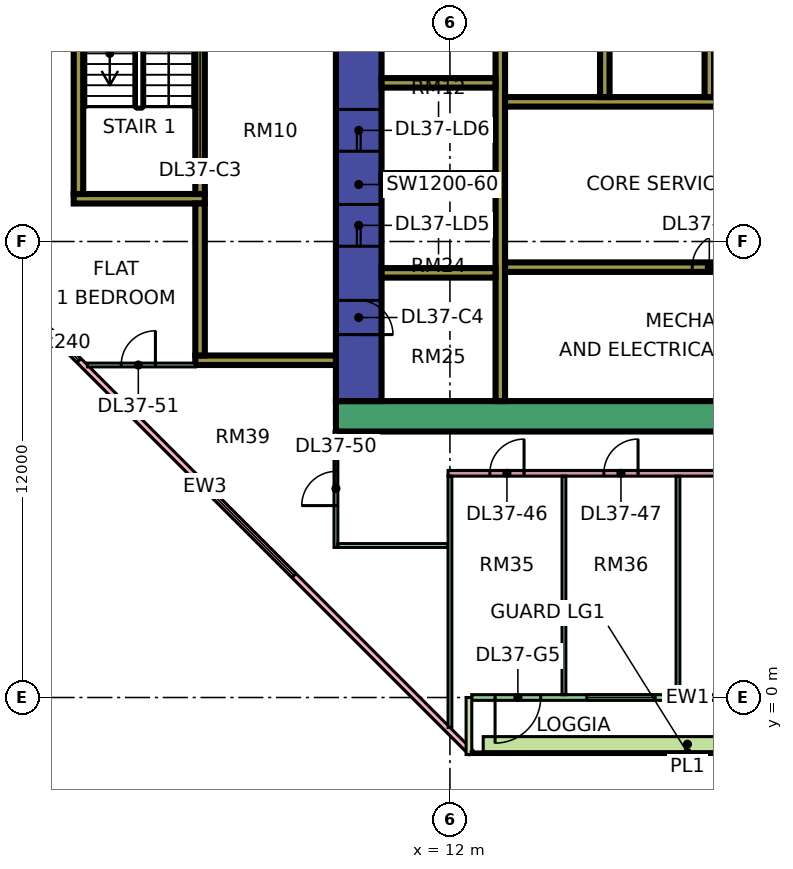
"""IFC4 building model, lengths in metres.
Left out: names, types, materials, properties, quantities, classifications, styles, units other than length and angle.
Written with IfcOpenShell. Run it as: python <this file> out.ifc"""

import sys

from ifc_helpers import new_model, si_unit, direction, frame, frame_2d, origin, place, context, subcontext, project, spatial, rectangle, extrude, element, fill, save


model = new_model("IFC4")
c1 = context("Model", 3, precision=1e-05, world=origin(), true_north=direction((0.0, 1.0)))
c2 = subcontext(c1, "Body", "Model", "MODEL_VIEW")
j1 = project(units=[si_unit("LENGTHUNIT", "METRE"), si_unit("PLANEANGLEUNIT", "RADIAN")], contexts=[c1])
p1 = place(None, origin())
s1 = spatial("IfcSite", under=j1, at=p1, CompositionType="ELEMENT")
p2 = place(p1, origin())
s2 = spatial("IfcBuilding", under=s1, at=p2, CompositionType="ELEMENT")
p3 = place(p2, frame((0.0, 0.0, 164.9)))
s3 = spatial("IfcBuildingStorey", under=s2, at=p3, CompositionType="ELEMENT", Elevation=164.9)
p4 = place(p3, frame((9.0, 7.4, 0.0), z_axis=(0.0, 0.0, 1.0), x_axis=(1.0, 0.0, 0.0)))
e1 = element("IfcWall", 1, at=p4, inside=s3, PredefinedType="SHEAR", context=c2, shape_type="SweptSolid", body=[
    extrude(rectangle(XDim=25.0, YDim=0.8, at=frame_2d((12.5, 0.0))), origin(), (0.0, 0.0, 1.0), 3.75),
])
p5 = place(p3, frame((9.6, 7.8, 0.0), z_axis=(0.0, 0.0, 1.0), x_axis=(0.0, 1.0, 0.0)))
e2 = element("IfcWall", 2, at=p5, inside=s3, PredefinedType="SHEAR", context=c2, shape_type="SweptSolid", body=[
    extrude(rectangle(XDim=11.4, YDim=1.2, at=frame_2d((5.7, 0.0))), origin(), (0.0, 0.0, 1.0), 3.75),
])
p6 = place(p5, frame((4.075, 0.0, 0.0)))
e3 = element("IfcOpeningElement", 3, at=p6, cuts=e2, PredefinedType="OPENING", context=c2, shape_type="SweptSolid", body=[
    extrude(rectangle(XDim=1.1, YDim=2.2, at=frame_2d((0.55, 1.1))), frame((0.0, 0.61, 0.0), z_axis=(0.0, -1.0, 0.0), x_axis=(1.0, 0.0, 0.0)), (0.0, 0.0, 1.0), 1.22),
])
p7 = place(p5, frame((6.575, 0.0, 0.0)))
e4 = element("IfcOpeningElement", 4, at=p7, cuts=e2, PredefinedType="OPENING", context=c2, shape_type="SweptSolid", body=[
    extrude(rectangle(XDim=1.1, YDim=2.2, at=frame_2d((0.55, 1.1))), frame((0.0, 0.61, 0.0), z_axis=(0.0, -1.0, 0.0), x_axis=(1.0, 0.0, 0.0)), (0.0, 0.0, 1.0), 1.22),
])
p8 = place(p5, frame((9.4, 0.0, 0.0)))
e5 = element("IfcOpeningElement", 5, at=p8, cuts=e2, PredefinedType="OPENING", context=c2, shape_type="SweptSolid", body=[
    extrude(rectangle(XDim=1.1, YDim=2.2, at=frame_2d((0.55, 1.1))), frame((0.0, 0.61, 0.0), z_axis=(0.0, -1.0, 0.0), x_axis=(1.0, 0.0, 0.0)), (0.0, 0.0, 1.0), 1.22),
])
p9 = place(p5, frame((1.75, 0.0, 0.0)))
e6 = element("IfcOpeningElement", 6, at=p9, cuts=e2, PredefinedType="OPENING", context=c2, shape_type="SweptSolid", body=[
    extrude(rectangle(XDim=0.9, YDim=2.1, at=frame_2d((0.45, 1.05))), frame((0.0, 0.61, 0.0), z_axis=(0.0, -1.0, 0.0), x_axis=(1.0, 0.0, 0.0)), (0.0, 0.0, 1.0), 1.22),
])
p10 = place(p3, frame((13.325, 7.8, 0.0), z_axis=(0.0, 0.0, 1.0), x_axis=(0.0, 1.0, 0.0)))
e7 = element("IfcWall", 7, at=p10, inside=s3, PredefinedType="SHEAR", context=c2, shape_type="SweptSolid", body=[
    extrude(rectangle(XDim=11.4, YDim=0.25, at=frame_2d((5.7, 0.0))), origin(), (0.0, 0.0, 1.0), 3.75),
])
p11 = place(p3, frame((13.45, 11.325, 0.0), z_axis=(0.0, 0.0, 1.0), x_axis=(1.0, 0.0, 0.0)))
e8 = element("IfcWall", 8, at=p11, inside=s3, PredefinedType="SHEAR", context=c2, shape_type="SweptSolid", body=[
    extrude(rectangle(XDim=19.75, YDim=0.25, at=frame_2d((9.875, 0.0))), origin(), (0.0, 0.0, 1.0), 3.75),
])
p12 = place(p11, frame((11.65, 0.0, 0.0)))
e9 = element("IfcOpeningElement", 9, at=p12, cuts=e8, PredefinedType="OPENING", context=c2, shape_type="SweptSolid", body=[
    extrude(rectangle(XDim=1.2, YDim=2.2, at=frame_2d((0.6, 1.1))), frame((0.0, 0.135, 0.0), z_axis=(0.0, -1.0, 0.0), x_axis=(1.0, 0.0, 0.0)), (0.0, 0.0, 1.0), 0.27),
])
p13 = place(p11, frame((14.4, 0.0, 0.0)))
e10 = element("IfcOpeningElement", 10, at=p13, cuts=e8, PredefinedType="OPENING", context=c2, shape_type="SweptSolid", body=[
    extrude(rectangle(XDim=1.2, YDim=2.2, at=frame_2d((0.6, 1.1))), frame((0.0, 0.135, 0.0), z_axis=(0.0, -1.0, 0.0), x_axis=(1.0, 0.0, 0.0)), (0.0, 0.0, 1.0), 0.27),
])
p14 = place(p11, frame((17.15, 0.0, 0.0)))
e11 = element("IfcOpeningElement", 11, at=p14, cuts=e8, PredefinedType="OPENING", context=c2, shape_type="SweptSolid", body=[
    extrude(rectangle(XDim=1.2, YDim=2.2, at=frame_2d((0.6, 1.1))), frame((0.0, 0.135, 0.0), z_axis=(0.0, -1.0, 0.0), x_axis=(1.0, 0.0, 0.0)), (0.0, 0.0, 1.0), 0.27),
])
p15 = place(p11, frame((4.925, 0.0, 0.0)))
e12 = element("IfcOpeningElement", 12, at=p15, cuts=e8, PredefinedType="OPENING", context=c2, shape_type="SweptSolid", body=[
    extrude(rectangle(XDim=0.9, YDim=2.1, at=frame_2d((0.45, 1.05))), frame((0.0, 0.135, 0.0), z_axis=(0.0, -1.0, 0.0), x_axis=(1.0, 0.0, 0.0)), (0.0, 0.0, 1.0), 0.27),
])
p16 = place(p3, frame((13.45, 15.675, 0.0), z_axis=(0.0, 0.0, 1.0), x_axis=(1.0, 0.0, 0.0)))
e13 = element("IfcWall", 13, at=p16, inside=s3, PredefinedType="SHEAR", context=c2, shape_type="SweptSolid", body=[
    extrude(rectangle(XDim=13.75, YDim=0.25, at=frame_2d((6.875, 0.0))), origin(), (0.0, 0.0, 1.0), 3.75),
])
p17 = place(p16, frame((11.65, 0.0, 0.0)))
e14 = element("IfcOpeningElement", 14, at=p17, cuts=e13, PredefinedType="OPENING", context=c2, shape_type="SweptSolid", body=[
    extrude(rectangle(XDim=1.2, YDim=2.2, at=frame_2d((0.6, 1.1))), frame((0.0, 0.135, 0.0), z_axis=(0.0, -1.0, 0.0), x_axis=(1.0, 0.0, 0.0)), (0.0, 0.0, 1.0), 0.27),
])
for number, where, z_axis, x_axis in (
    (15, (10.2, 11.175, 0.0), (0.0, 0.0, 1.0), (1.0, 0.0, 0.0)),
    (16, (10.2, 13.675, 0.0), (0.0, 0.0, 1.0), (1.0, 0.0, 0.0)),
    (17, (10.2, 16.175, 0.0), (0.0, 0.0, 1.0), (1.0, 0.0, 0.0)),
):
    element("IfcWall", number, at=place(p3, frame(where, z_axis=z_axis, x_axis=x_axis)), inside=s3, PredefinedType="SHEAR", context=c2, shape_type="SweptSolid", body=[
        extrude(rectangle(XDim=3.0, YDim=0.25, at=frame_2d((1.5, 0.0))), origin(), (0.0, 0.0, 1.0), 3.75),
    ])
for number, where, z_axis, x_axis in (
    (18, (16.075, 15.8, 0.0), (0.0, 0.0, 1.0), (0.0, 1.0, 0.0)),
    (19, (18.825, 15.8, 0.0), (0.0, 0.0, 1.0), (0.0, 1.0, 0.0)),
):
    element("IfcWall", number, at=place(p3, frame(where, z_axis=z_axis, x_axis=x_axis)), inside=s3, PredefinedType="SHEAR", context=c2, shape_type="SweptSolid", body=[
        extrude(rectangle(XDim=3.4, YDim=0.25, at=frame_2d((1.7, 0.0))), origin(), (0.0, 0.0, 1.0), 3.75),
    ])
p18 = place(p3, frame((2.1, 13.125, 0.0), z_axis=(0.0, 0.0, 1.0), x_axis=(1.0, 0.0, 0.0)))
e20 = element("IfcWall", 20, at=p18, inside=s3, PredefinedType="SHEAR", context=c2, shape_type="SweptSolid", body=[
    extrude(rectangle(XDim=3.45, YDim=0.25, at=frame_2d((1.725, 0.0))), origin(), (0.0, 0.0, 1.0), 3.75),
])
p19 = place(p3, frame((2.225, 13.25, 0.0), z_axis=(0.0, 0.0, 1.0), x_axis=(0.0, 1.0, 0.0)))
e21 = element("IfcWall", 21, at=p19, inside=s3, PredefinedType="SHEAR", context=c2, shape_type="SweptSolid", body=[
    extrude(rectangle(XDim=6.5, YDim=0.25, at=frame_2d((3.25, 0.0))), origin(), (0.0, 0.0, 1.0), 3.75),
])
p20 = place(p3, frame((5.425, 13.25, 0.0), z_axis=(0.0, 0.0, 1.0), x_axis=(0.0, 1.0, 0.0)))
e22 = element("IfcWall", 22, at=p20, inside=s3, PredefinedType="SHEAR", context=c2, shape_type="SweptSolid", body=[
    extrude(rectangle(XDim=6.5, YDim=0.25, at=frame_2d((3.25, 0.0))), origin(), (0.0, 0.0, 1.0), 3.75),
])
p21 = place(p20, frame((5.25, 0.0, 0.0)))
e23 = element("IfcOpeningElement", 23, at=p21, cuts=e22, PredefinedType="OPENING", context=c2, shape_type="SweptSolid", body=[
    extrude(rectangle(XDim=1.1, YDim=2.2, at=frame_2d((0.55, 1.1))), frame((0.0, 0.135, 0.0), z_axis=(0.0, -1.0, 0.0), x_axis=(1.0, 0.0, 0.0)), (0.0, 0.0, 1.0), 0.27),
])
p22 = place(p3, frame((5.3, 8.875, 0.0), z_axis=(0.0, 0.0, 1.0), x_axis=(1.0, 0.0, 0.0)))
e24 = element("IfcWall", 24, at=p22, inside=s3, PredefinedType="SHEAR", context=c2, shape_type="SweptSolid", body=[
    extrude(rectangle(XDim=3.7, YDim=0.25, at=frame_2d((1.85, 0.0))), origin(), (0.0, 0.0, 1.0), 3.75),
])
p23 = place(p3, frame((5.425, 9.0, 0.0), z_axis=(0.0, 0.0, 1.0), x_axis=(0.0, 1.0, 0.0)))
e25 = element("IfcWall", 25, at=p23, inside=s3, PredefinedType="SHEAR", context=c2, shape_type="SweptSolid", body=[
    extrude(rectangle(XDim=4.0, YDim=0.25, at=frame_2d((2.0, 0.0))), origin(), (0.0, 0.0, 1.0), 3.75),
])
p24 = place(p3, frame((-1.447, 12.553, 0.0), z_axis=(0.0, 0.0, 1.0), x_axis=(0.707106781187, -0.707106781187, 0.0)))
e26 = element("IfcWall", 26, at=p24, inside=s3, PredefinedType="SOLIDWALL", context=c2, shape_type="SweptSolid", body=[
    extrude(rectangle(XDim=19.799, YDim=0.15, at=frame_2d((9.899, 0.0))), origin(), (0.0, 0.0, 1.0), 3.35),
])
p25 = place(p24, frame((2.212, 0.0, 0.45)))
e27 = element("IfcOpeningElement", 27, at=p25, cuts=e26, PredefinedType="OPENING", context=c2, shape_type="SweptSolid", body=[
    extrude(rectangle(XDim=3.0, YDim=2.4, at=frame_2d((1.5, 1.2))), frame((0.0, 0.085, 0.0), z_axis=(0.0, -1.0, 0.0), x_axis=(1.0, 0.0, 0.0)), (0.0, 0.0, 1.0), 0.17),
])
p26 = place(p24, frame((10.216, 0.0, 0.45)))
e28 = element("IfcOpeningElement", 28, at=p26, cuts=e26, PredefinedType="OPENING", context=c2, shape_type="SweptSolid", body=[
    extrude(rectangle(XDim=3.0, YDim=2.4, at=frame_2d((1.5, 1.2))), frame((0.0, 0.085, 0.0), z_axis=(0.0, -1.0, 0.0), x_axis=(1.0, 0.0, 0.0)), (0.0, 0.0, 1.0), 0.17),
])
p27 = place(p3, frame((12.575, 0.0, 0.0), z_axis=(0.0, 0.0, 1.0), x_axis=(1.0, 0.0, 0.0)))
e29 = element("IfcWall", 29, at=p27, inside=s3, PredefinedType="SOLIDWALL", context=c2, shape_type="SweptSolid", body=[
    extrude(rectangle(XDim=11.35, YDim=0.15, at=frame_2d((5.675, 0.0))), origin(), (0.0, 0.0, 1.0), 3.35),
])
p28 = place(p27, frame((0.613, 0.0, 0.0)))
e30 = element("IfcOpeningElement", 30, at=p28, cuts=e29, PredefinedType="OPENING", context=c2, shape_type="SweptSolid", body=[
    extrude(rectangle(XDim=1.2, YDim=2.4, at=frame_2d((0.6, 1.2))), frame((0.0, 0.085, 0.0), z_axis=(0.0, -1.0, 0.0), x_axis=(1.0, 0.0, 0.0)), (0.0, 0.0, 1.0), 0.17),
])
p29 = place(p27, frame((3.025, 0.0, 0.45)))
e31 = element("IfcOpeningElement", 31, at=p29, cuts=e29, PredefinedType="OPENING", context=c2, shape_type="SweptSolid", body=[
    extrude(rectangle(XDim=1.8, YDim=2.4, at=frame_2d((0.9, 1.2))), frame((0.0, 0.085, 0.0), z_axis=(0.0, -1.0, 0.0), x_axis=(1.0, 0.0, 0.0)), (0.0, 0.0, 1.0), 0.17),
])
p30 = place(p27, frame((6.65, 0.0, 0.45)))
e32 = element("IfcOpeningElement", 32, at=p30, cuts=e29, PredefinedType="OPENING", context=c2, shape_type="SweptSolid", body=[
    extrude(rectangle(XDim=3.0, YDim=2.4, at=frame_2d((1.5, 1.2))), frame((0.0, 0.085, 0.0), z_axis=(0.0, -1.0, 0.0), x_axis=(1.0, 0.0, 0.0)), (0.0, 0.0, 1.0), 0.17),
])
p31 = place(p3, frame((12.5, -1.5, 0.0), z_axis=(0.0, 0.0, 1.0), x_axis=(0.0, 1.0, 0.0)))
e33 = element("IfcWall", 33, at=p31, inside=s3, PredefinedType="SOLIDWALL", context=c2, shape_type="SweptSolid", body=[
    extrude(rectangle(XDim=1.5, YDim=0.15, at=frame_2d((0.75, 0.0))), origin(), (0.0, 0.0, 1.0), 3.35),
])
p32 = place(p3, frame((12.875, -1.229, 0.0), z_axis=(0.0, 0.0, 1.0), x_axis=(1.0, 0.0, 0.0)))
e34 = element("IfcWall", 34, at=p32, inside=s3, PredefinedType="SOLIDWALL", context=c2, shape_type="SweptSolid", body=[
    extrude(rectangle(XDim=10.75, YDim=0.4, at=frame_2d((5.375, 0.0))), origin(), (0.0, 0.0, 1.0), 0.7),
])
p33 = place(p3, frame((2.461, 8.75, 0.0), z_axis=(0.0, 0.0, 1.0), x_axis=(1.0, 0.0, 0.0)))
e35 = element("IfcWall", 35, at=p33, inside=s3, PredefinedType="PARTITIONING", context=c2, shape_type="SweptSolid", body=[
    extrude(rectangle(XDim=2.839, YDim=0.1, at=frame_2d((1.419, 0.0))), origin(), (0.0, 0.0, 1.0), 3.35),
])
p34 = place(p33, frame((0.889, 0.0, 0.0)))
e36 = element("IfcOpeningElement", 36, at=p34, cuts=e35, PredefinedType="OPENING", context=c2, shape_type="SweptSolid", body=[
    extrude(rectangle(XDim=0.9, YDim=2.1, at=frame_2d((0.45, 1.05))), frame((0.0, 0.06, 0.0), z_axis=(0.0, -1.0, 0.0), x_axis=(1.0, 0.0, 0.0)), (0.0, 0.0, 1.0), 0.12),
])
p35 = place(p3, frame((9.0, 3.95, 0.0), z_axis=(0.0, 0.0, 1.0), x_axis=(0.0, 1.0, 0.0)))
e37 = element("IfcWall", 37, at=p35, inside=s3, PredefinedType="PARTITIONING", context=c2, shape_type="SweptSolid", body=[
    extrude(rectangle(XDim=3.05, YDim=0.1, at=frame_2d((1.525, 0.0))), origin(), (0.0, 0.0, 1.0), 3.35),
])
p36 = place(p35, frame((1.1, 0.0, 0.0)))
e38 = element("IfcOpeningElement", 38, at=p36, cuts=e37, PredefinedType="OPENING", context=c2, shape_type="SweptSolid", body=[
    extrude(rectangle(XDim=0.9, YDim=2.1, at=frame_2d((0.45, 1.05))), frame((0.0, 0.06, 0.0), z_axis=(0.0, -1.0, 0.0), x_axis=(1.0, 0.0, 0.0)), (0.0, 0.0, 1.0), 0.12),
])
p37 = place(p3, frame((9.05, 4.0, 0.0), z_axis=(0.0, 0.0, 1.0), x_axis=(1.0, 0.0, 0.0)))
e39 = element("IfcWall", 39, at=p37, inside=s3, PredefinedType="PARTITIONING", context=c2, shape_type="SweptSolid", body=[
    extrude(rectangle(XDim=2.9, YDim=0.1, at=frame_2d((1.45, 0.0))), origin(), (0.0, 0.0, 1.0), 3.35),
])
p38 = place(p3, frame((11.95, 5.9, 0.0), z_axis=(0.0, 0.0, 1.0), x_axis=(1.0, 0.0, 0.0)))
e40 = element("IfcWall", 40, at=p38, inside=s3, PredefinedType="PARTITIONING", context=c2, shape_type="SweptSolid", body=[
    extrude(rectangle(XDim=21.1, YDim=0.15, at=frame_2d((10.55, 0.0))), origin(), (0.0, 0.0, 1.0), 3.35),
])
p39 = place(p38, frame((1.1, 0.0, 0.0)))
e41 = element("IfcOpeningElement", 41, at=p39, cuts=e40, PredefinedType="OPENING", context=c2, shape_type="SweptSolid", body=[
    extrude(rectangle(XDim=0.9, YDim=2.1, at=frame_2d((0.45, 1.05))), frame((0.0, 0.085, 0.0), z_axis=(0.0, -1.0, 0.0), x_axis=(1.0, 0.0, 0.0)), (0.0, 0.0, 1.0), 0.17),
])
p40 = place(p38, frame((4.1, 0.0, 0.0)))
e42 = element("IfcOpeningElement", 42, at=p40, cuts=e40, PredefinedType="OPENING", context=c2, shape_type="SweptSolid", body=[
    extrude(rectangle(XDim=0.9, YDim=2.1, at=frame_2d((0.45, 1.05))), frame((0.0, 0.085, 0.0), z_axis=(0.0, -1.0, 0.0), x_axis=(1.0, 0.0, 0.0)), (0.0, 0.0, 1.0), 0.17),
])
p41 = place(p38, frame((10.1, 0.0, 0.0)))
e43 = element("IfcOpeningElement", 43, at=p41, cuts=e40, PredefinedType="OPENING", context=c2, shape_type="SweptSolid", body=[
    extrude(rectangle(XDim=0.9, YDim=2.1, at=frame_2d((0.45, 1.05))), frame((0.0, 0.085, 0.0), z_axis=(0.0, -1.0, 0.0), x_axis=(1.0, 0.0, 0.0)), (0.0, 0.0, 1.0), 0.17),
])
p42 = place(p3, frame((12.0, -0.788, 0.0), z_axis=(0.0, 0.0, 1.0), x_axis=(0.0, 1.0, 0.0)))
e44 = element("IfcWall", 44, at=p42, inside=s3, PredefinedType="PARTITIONING", context=c2, shape_type="SweptSolid", body=[
    extrude(rectangle(XDim=6.613, YDim=0.1, at=frame_2d((3.306, 0.0))), origin(), (0.0, 0.0, 1.0), 3.35),
])
for number, where, z_axis, x_axis in (
    (45, (15.0, 0.074, 0.0), (0.0, 0.0, 1.0), (0.0, 1.0, 0.0)),
    (46, (18.0, 0.074, 0.0), (0.0, 0.0, 1.0), (0.0, 1.0, 0.0)),
):
    element("IfcWall", number, at=place(p3, frame(where, z_axis=z_axis, x_axis=x_axis)), inside=s3, PredefinedType="PARTITIONING", context=c2, shape_type="SweptSolid", body=[
        extrude(rectangle(XDim=5.751, YDim=0.1, at=frame_2d((2.875, 0.0))), origin(), (0.0, 0.0, 1.0), 3.35),
    ])
p43 = place(p25, origin())
e47 = element("IfcWindow", 47, at=p43, inside=s3, PartitioningType="SINGLE_PANEL", PredefinedType="WINDOW", context=c2, shape_type="SweptSolid", body=[
    extrude(rectangle(XDim=3.0, YDim=2.4, at=frame_2d((1.5, 1.2))), frame((0.0, 0.03, 0.0), z_axis=(0.0, -1.0, 0.0), x_axis=(1.0, 0.0, 0.0)), (0.0, 0.0, 1.0), 0.06),
])
fill(e27, e47)
p44 = place(p26, origin())
e48 = element("IfcWindow", 48, at=p44, inside=s3, PartitioningType="SINGLE_PANEL", PredefinedType="WINDOW", context=c2, shape_type="SweptSolid", body=[
    extrude(rectangle(XDim=3.0, YDim=2.4, at=frame_2d((1.5, 1.2))), frame((0.0, 0.03, 0.0), z_axis=(0.0, -1.0, 0.0), x_axis=(1.0, 0.0, 0.0)), (0.0, 0.0, 1.0), 0.06),
])
fill(e28, e48)
p45 = place(p28, frame((1.2, 0.0, 0.0), z_axis=(0.0, 0.0, 1.0), x_axis=(-1.0, 0.0, 0.0)))
e49 = element("IfcDoor", 49, at=p45, inside=s3, OperationType="DOUBLE_DOOR_SINGLE_SWING", PredefinedType="DOOR", context=c2, shape_type="SweptSolid", body=[
    extrude(rectangle(XDim=1.2, YDim=2.4, at=frame_2d((0.6, 1.2))), frame((0.0, 0.025, 0.0), z_axis=(0.0, -1.0, 0.0), x_axis=(1.0, 0.0, 0.0)), (0.0, 0.0, 1.0), 0.05),
])
fill(e30, e49)
p46 = place(p29, origin())
e50 = element("IfcWindow", 50, at=p46, inside=s3, PartitioningType="SINGLE_PANEL", PredefinedType="WINDOW", context=c2, shape_type="SweptSolid", body=[
    extrude(rectangle(XDim=1.8, YDim=2.4, at=frame_2d((0.9, 1.2))), frame((0.0, 0.03, 0.0), z_axis=(0.0, -1.0, 0.0), x_axis=(1.0, 0.0, 0.0)), (0.0, 0.0, 1.0), 0.06),
])
fill(e31, e50)
p47 = place(p6, origin())
e51 = element("IfcDoor", 51, at=p47, inside=s3, OperationType="DOUBLE_DOOR_SLIDING", PredefinedType="DOOR", context=c2, shape_type="SweptSolid", body=[
    extrude(rectangle(XDim=1.1, YDim=2.2, at=frame_2d((0.55, 1.1))), frame((0.0, 0.025, 0.0), z_axis=(0.0, -1.0, 0.0), x_axis=(1.0, 0.0, 0.0)), (0.0, 0.0, 1.0), 0.05),
])
fill(e3, e51)
p48 = place(p7, origin())
e52 = element("IfcDoor", 52, at=p48, inside=s3, OperationType="DOUBLE_DOOR_SLIDING", PredefinedType="DOOR", context=c2, shape_type="SweptSolid", body=[
    extrude(rectangle(XDim=1.1, YDim=2.2, at=frame_2d((0.55, 1.1))), frame((0.0, 0.025, 0.0), z_axis=(0.0, -1.0, 0.0), x_axis=(1.0, 0.0, 0.0)), (0.0, 0.0, 1.0), 0.05),
])
fill(e4, e52)
p49 = place(p9, frame((0.9, 0.0, 0.0), z_axis=(0.0, 0.0, 1.0), x_axis=(-1.0, 0.0, 0.0)))
e53 = element("IfcDoor", 53, at=p49, inside=s3, OperationType="SINGLE_SWING_LEFT", PredefinedType="DOOR", context=c2, shape_type="SweptSolid", body=[
    extrude(rectangle(XDim=0.9, YDim=2.1, at=frame_2d((0.45, 1.05))), frame((0.0, 0.025, 0.0), z_axis=(0.0, -1.0, 0.0), x_axis=(1.0, 0.0, 0.0)), (0.0, 0.0, 1.0), 0.05),
])
fill(e6, e53)
p50 = place(p15, frame((0.9, 0.0, 0.0), z_axis=(0.0, 0.0, 1.0), x_axis=(-1.0, 0.0, 0.0)))
e54 = element("IfcDoor", 54, at=p50, inside=s3, OperationType="SINGLE_SWING_RIGHT", PredefinedType="DOOR", context=c2, shape_type="SweptSolid", body=[
    extrude(rectangle(XDim=0.9, YDim=2.1, at=frame_2d((0.45, 1.05))), frame((0.0, 0.025, 0.0), z_axis=(0.0, -1.0, 0.0), x_axis=(1.0, 0.0, 0.0)), (0.0, 0.0, 1.0), 0.05),
])
fill(e12, e54)
p51 = place(p39, frame((0.9, 0.0, 0.0), z_axis=(0.0, 0.0, 1.0), x_axis=(-1.0, 0.0, 0.0)))
e55 = element("IfcDoor", 55, at=p51, inside=s3, OperationType="SINGLE_SWING_RIGHT", PredefinedType="DOOR", context=c2, shape_type="SweptSolid", body=[
    extrude(rectangle(XDim=0.9, YDim=2.1, at=frame_2d((0.45, 1.05))), frame((0.0, 0.025, 0.0), z_axis=(0.0, -1.0, 0.0), x_axis=(1.0, 0.0, 0.0)), (0.0, 0.0, 1.0), 0.05),
])
fill(e41, e55)
p52 = place(p40, frame((0.9, 0.0, 0.0), z_axis=(0.0, 0.0, 1.0), x_axis=(-1.0, 0.0, 0.0)))
e56 = element("IfcDoor", 56, at=p52, inside=s3, OperationType="SINGLE_SWING_RIGHT", PredefinedType="DOOR", context=c2, shape_type="SweptSolid", body=[
    extrude(rectangle(XDim=0.9, YDim=2.1, at=frame_2d((0.45, 1.05))), frame((0.0, 0.025, 0.0), z_axis=(0.0, -1.0, 0.0), x_axis=(1.0, 0.0, 0.0)), (0.0, 0.0, 1.0), 0.05),
])
fill(e42, e56)
p53 = place(p36, origin())
e57 = element("IfcDoor", 57, at=p53, inside=s3, OperationType="SINGLE_SWING_LEFT", PredefinedType="DOOR", context=c2, shape_type="SweptSolid", body=[
    extrude(rectangle(XDim=0.9, YDim=2.1, at=frame_2d((0.45, 1.05))), frame((0.0, 0.025, 0.0), z_axis=(0.0, -1.0, 0.0), x_axis=(1.0, 0.0, 0.0)), (0.0, 0.0, 1.0), 0.05),
])
fill(e38, e57)
p54 = place(p34, frame((0.9, 0.0, 0.0), z_axis=(0.0, 0.0, 1.0), x_axis=(-1.0, 0.0, 0.0)))
e58 = element("IfcDoor", 58, at=p54, inside=s3, OperationType="SINGLE_SWING_RIGHT", PredefinedType="DOOR", context=c2, shape_type="SweptSolid", body=[
    extrude(rectangle(XDim=0.9, YDim=2.1, at=frame_2d((0.45, 1.05))), frame((0.0, 0.025, 0.0), z_axis=(0.0, -1.0, 0.0), x_axis=(1.0, 0.0, 0.0)), (0.0, 0.0, 1.0), 0.05),
])
fill(e36, e58)
save(model, sys.argv[1])
